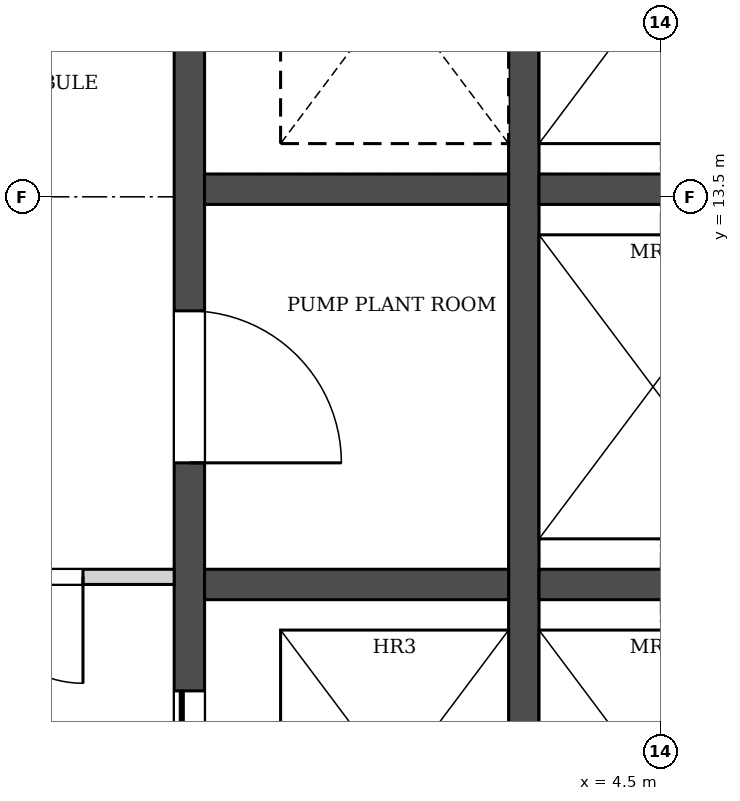
"""IFC4 building model, lengths in metres.
Left out: names, types, materials, properties, quantities, classifications, styles, units other than length and angle.
Written with IfcOpenShell. Run it as: python <this file> out.ifc"""

import sys

from ifc_helpers import new_model, si_unit, direction, frame, frame_2d, origin, place, context, subcontext, project, spatial, rectangle, extrude, element, fill, save


model = new_model("IFC4")
c1 = context("Model", 3, precision=1e-05, world=origin(), true_north=direction((0.0, 1.0)))
c2 = subcontext(c1, "Body", "Model", "MODEL_VIEW")
j1 = project(units=[si_unit("LENGTHUNIT", "METRE"), si_unit("PLANEANGLEUNIT", "RADIAN")], contexts=[c1])
p1 = place(None, origin())
s1 = spatial("IfcSite", under=j1, at=p1, CompositionType="ELEMENT")
p2 = place(p1, origin())
s2 = spatial("IfcBuilding", under=s1, at=p2, CompositionType="ELEMENT")
p3 = place(p2, frame((0.0, 0.0, 259.5)))
s3 = spatial("IfcBuildingStorey", under=s2, at=p3, CompositionType="ELEMENT", Elevation=259.5)
p4 = place(p3, frame((26.022, 7.709, 0.0), z_axis=(0.0, 0.0, 1.0), x_axis=(-0.500000891752, 0.866024888931, 0.0)))
e1 = element("IfcWall", 1, at=p4, inside=s3, PredefinedType="SOLIDWALL", context=c2, shape_type="SweptSolid", body=[
    extrude(rectangle(XDim=43.339, YDim=0.34, at=frame_2d((21.669, 0.0))), origin(), (0.0, 0.0, 1.0), 6.8),
])
p5 = place(p4, frame((19.335, 0.0, 0.9)))
e2 = element("IfcOpeningElement", 2, at=p5, cuts=e1, PredefinedType="OPENING", context=c2, shape_type="SweptSolid", body=[
    extrude(rectangle(XDim=1.885, YDim=3.0, at=frame_2d((0.942, 1.5))), frame((0.0, 0.18, 0.0), z_axis=(0.0, -1.0, 0.0), x_axis=(1.0, 0.0, 0.0)), (0.0, 0.0, 1.0), 0.36),
])
p6 = place(p4, frame((34.335, 0.0, 0.9)))
e3 = element("IfcOpeningElement", 3, at=p6, cuts=e1, PredefinedType="OPENING", context=c2, shape_type="SweptSolid", body=[
    extrude(rectangle(XDim=1.885, YDim=3.0, at=frame_2d((0.942, 1.5))), frame((0.0, 0.18, 0.0), z_axis=(0.0, -1.0, 0.0), x_axis=(1.0, 0.0, 0.0)), (0.0, 0.0, 1.0), 0.36),
])
p7 = place(p4, frame((40.335, 0.0, 0.9)))
e4 = element("IfcOpeningElement", 4, at=p7, cuts=e1, PredefinedType="OPENING", context=c2, shape_type="SweptSolid", body=[
    extrude(rectangle(XDim=1.885, YDim=3.0, at=frame_2d((0.942, 1.5))), frame((0.0, 0.18, 0.0), z_axis=(0.0, -1.0, 0.0), x_axis=(1.0, 0.0, 0.0)), (0.0, 0.0, 1.0), 0.36),
])
p8 = place(p3, frame((3.6, 8.45, -0.4), z_axis=(0.0, 0.0, 1.0), x_axis=(0.0, 1.0, 0.0)))
e5 = element("IfcWall", 5, at=p8, inside=s3, PredefinedType="SOLIDWALL", context=c2, shape_type="SweptSolid", body=[
    extrude(rectangle(XDim=7.8, YDim=0.2, at=frame_2d((3.9, 0.0))), origin(), (0.0, 0.0, 1.0), 7.2),
])
p9 = place(p3, frame((1.4, 5.85, -0.4), z_axis=(0.0, 0.0, 1.0), x_axis=(0.0, 1.0, 0.0)))
e6 = element("IfcWall", 6, at=p9, inside=s3, PredefinedType="SOLIDWALL", context=c2, shape_type="SweptSolid", body=[
    extrude(rectangle(XDim=11.75, YDim=0.2, at=frame_2d((5.875, 0.0))), origin(), (0.0, 0.0, 1.0), 7.2),
])
p10 = place(p9, frame((3.2, 0.0, 0.4)))
e7 = element("IfcOpeningElement", 7, at=p10, cuts=e6, PredefinedType="OPENING", context=c2, shape_type="SweptSolid", body=[
    extrude(rectangle(XDim=1.2, YDim=2.1, at=frame_2d((0.6, 1.05))), frame((0.0, 0.11, 0.0), z_axis=(0.0, -1.0, 0.0), x_axis=(1.0, 0.0, 0.0)), (0.0, 0.0, 1.0), 0.22),
])
p11 = place(p9, frame((0.65, 0.0, 0.4)))
e8 = element("IfcOpeningElement", 8, at=p11, cuts=e6, PredefinedType="OPENING", context=c2, shape_type="SweptSolid", body=[
    extrude(rectangle(XDim=1.1, YDim=2.1, at=frame_2d((0.55, 1.05))), frame((0.0, 0.11, 0.0), z_axis=(0.0, -1.0, 0.0), x_axis=(1.0, 0.0, 0.0)), (0.0, 0.0, 1.0), 0.22),
])
p12 = place(p9, frame((5.9, 0.0, 0.4)))
e9 = element("IfcOpeningElement", 9, at=p12, cuts=e6, PredefinedType="OPENING", context=c2, shape_type="SweptSolid", body=[
    extrude(rectangle(XDim=1.0, YDim=2.1, at=frame_2d((0.5, 1.05))), frame((0.0, 0.11, 0.0), z_axis=(0.0, -1.0, 0.0), x_axis=(1.0, 0.0, 0.0)), (0.0, 0.0, 1.0), 0.22),
])
for number, where, z_axis, x_axis in (
    (10, (3.7, 10.95, -0.4), (0.0, 0.0, 1.0), (1.0, 0.0, 0.0)),
    (11, (3.7, 13.55, -0.4), (0.0, 0.0, 1.0), (1.0, 0.0, 0.0)),
    (12, (1.5, 10.95, -0.4), (0.0, 0.0, 1.0), (1.0, 0.0, 0.0)),
    (13, (1.5, 13.55, -0.4), (0.0, 0.0, 1.0), (1.0, 0.0, 0.0)),
):
    element("IfcWall", number, at=place(p3, frame(where, z_axis=z_axis, x_axis=x_axis)), inside=s3, PredefinedType="SOLIDWALL", context=c2, shape_type="SweptSolid", body=[
        extrude(rectangle(XDim=2.0, YDim=0.2, at=frame_2d((1.0, 0.0))), origin(), (0.0, 0.0, 1.0), 7.2),
    ])
p13 = place(p3, frame((-1.3, 11.0, 0.0), z_axis=(0.0, 0.0, 1.0), x_axis=(1.0, 0.0, 0.0)))
e14 = element("IfcWall", 14, at=p13, inside=s3, PredefinedType="PARTITIONING", context=c2, shape_type="SweptSolid", body=[
    extrude(rectangle(XDim=2.6, YDim=0.1, at=frame_2d((1.3, 0.0))), origin(), (0.0, 0.0, 1.0), 6.8),
])
p14 = place(p13, frame((0.6, 0.0, 0.0)))
e15 = element("IfcOpeningElement", 15, at=p14, cuts=e14, PredefinedType="OPENING", context=c2, shape_type="SweptSolid", body=[
    extrude(rectangle(XDim=1.4, YDim=2.1, at=frame_2d((0.7, 1.05))), frame((0.0, 0.06, 0.0), z_axis=(0.0, -1.0, 0.0), x_axis=(1.0, 0.0, 0.0)), (0.0, 0.0, 1.0), 0.12),
])
p15 = place(p10, origin())
e16 = element("IfcDoor", 16, at=p15, inside=s3, OperationType="SLIDING_TO_LEFT", PredefinedType="DOOR", context=c2, shape_type="SweptSolid", body=[
    extrude(rectangle(XDim=1.2, YDim=2.1, at=frame_2d((0.6, 1.05))), frame((0.0, 0.025, 0.0), z_axis=(0.0, -1.0, 0.0), x_axis=(1.0, 0.0, 0.0)), (0.0, 0.0, 1.0), 0.05),
])
fill(e7, e16)
p16 = place(p12, frame((1.0, 0.0, 0.0), z_axis=(0.0, 0.0, 1.0), x_axis=(-1.0, 0.0, 0.0)))
e17 = element("IfcDoor", 17, at=p16, inside=s3, OperationType="SINGLE_SWING_RIGHT", PredefinedType="DOOR", context=c2, shape_type="SweptSolid", body=[
    extrude(rectangle(XDim=1.0, YDim=2.1, at=frame_2d((0.5, 1.05))), frame((0.0, 0.025, 0.0), z_axis=(0.0, -1.0, 0.0), x_axis=(1.0, 0.0, 0.0)), (0.0, 0.0, 1.0), 0.05),
])
fill(e9, e17)
p17 = place(p14, frame((1.4, 0.0, 0.0), z_axis=(0.0, 0.0, 1.0), x_axis=(-1.0, 0.0, 0.0)))
e18 = element("IfcDoor", 18, at=p17, inside=s3, OperationType="DOUBLE_DOOR_SINGLE_SWING", PredefinedType="DOOR", context=c2, shape_type="SweptSolid", body=[
    extrude(rectangle(XDim=1.4, YDim=2.1, at=frame_2d((0.7, 1.05))), frame((0.0, 0.025, 0.0), z_axis=(0.0, -1.0, 0.0), x_axis=(1.0, 0.0, 0.0)), (0.0, 0.0, 1.0), 0.05),
])
fill(e15, e18)
save(model, sys.argv[1])
